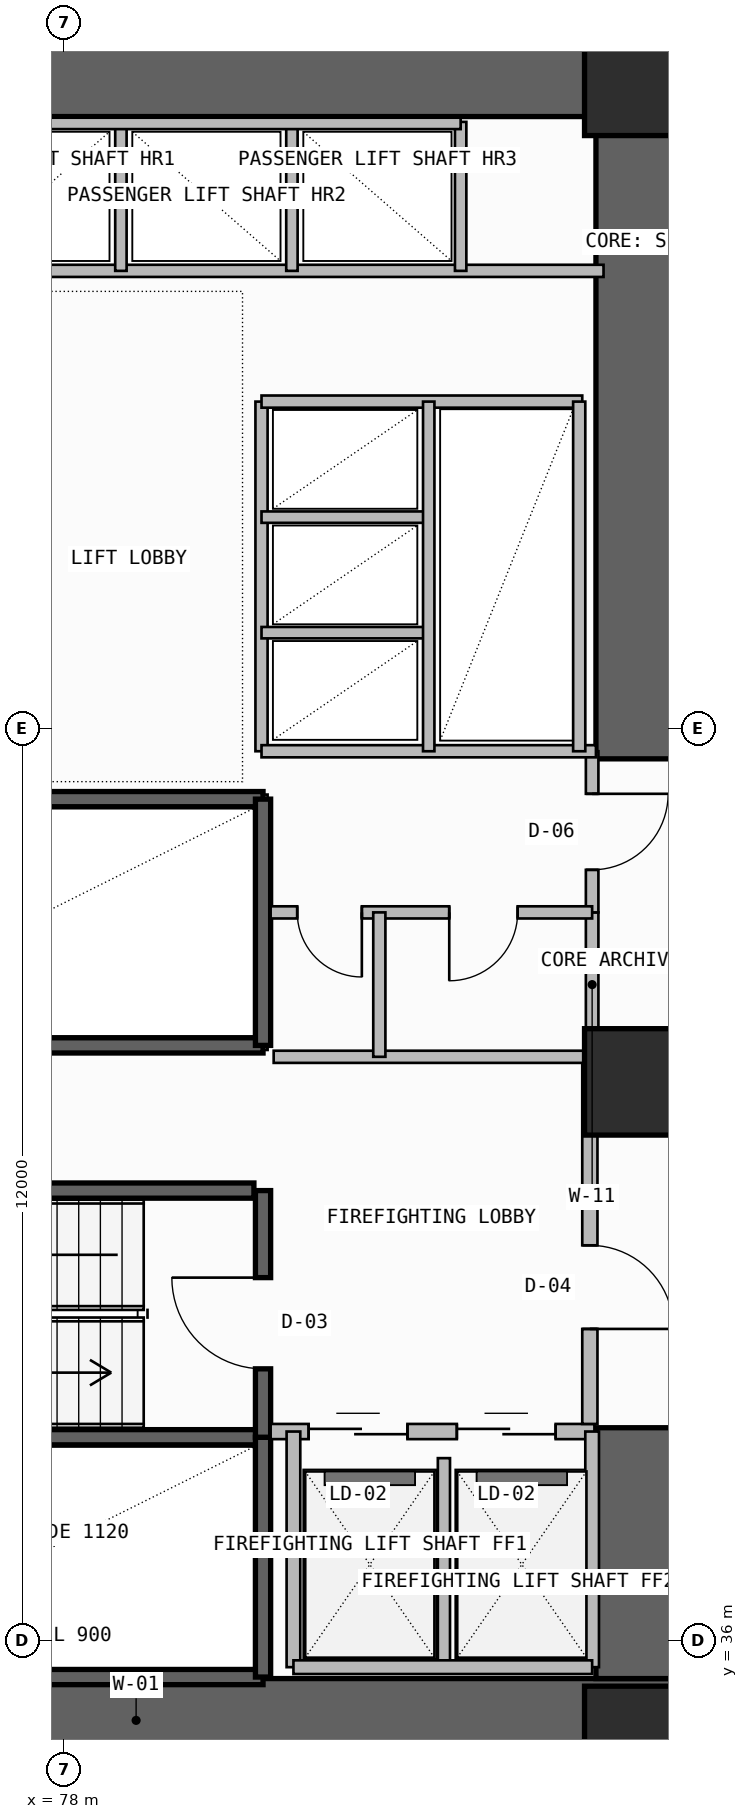
"""IFC4 building model, lengths in metres.
Left out: names, types, materials, properties, quantities, classifications, styles, units other than length and angle.
Written with IfcOpenShell. Run it as: python <this file> out.ifc"""

import sys

from ifc_helpers import new_model, si_unit, direction, frame, frame_2d, origin, origin_2d, place, context, subcontext, project, spatial, rectangle, extrude, element, fill, save


model = new_model("IFC4")
c1 = context("Model", 3, precision=1e-05, world=origin(), true_north=direction((0.0, 1.0)))
c2 = subcontext(c1, "Body", "Model", "MODEL_VIEW")
j1 = project(units=[si_unit("LENGTHUNIT", "METRE"), si_unit("PLANEANGLEUNIT", "RADIAN")], contexts=[c1])
p1 = place(None, origin())
s1 = spatial("IfcSite", under=j1, at=p1, CompositionType="ELEMENT")
p2 = place(p1, origin())
s2 = spatial("IfcBuilding", under=s1, at=p2, CompositionType="ELEMENT")
p3 = place(p2, frame((0.0, 0.0, 84.9)))
s3 = spatial("IfcBuildingStorey", under=s2, at=p3, CompositionType="ELEMENT", Elevation=84.9)
p4 = place(p3, frame((71.8, 34.95, -0.26), z_axis=(0.0, 0.0, 1.0), x_axis=(1.0, 0.0, 0.0)))
e1 = element("IfcWall", 1, at=p4, inside=s3, PredefinedType="SHEAR", context=c2, shape_type="SweptSolid", body=[
    extrude(rectangle(XDim=14.3, YDim=1.1, at=frame_2d((7.15, 0.0))), origin(), (0.0, 0.0, 1.0), 3.6),
])
p5 = place(p3, frame((85.55, 35.5, -0.26), z_axis=(0.0, 0.0, 1.0), x_axis=(0.0, 1.0, 0.0)))
e2 = element("IfcWall", 2, at=p5, inside=s3, PredefinedType="SHEAR", context=c2, shape_type="SweptSolid", body=[
    extrude(rectangle(XDim=3.3, YDim=1.1, at=frame_2d((1.65, 0.0))), origin(), (0.0, 0.0, 1.0), 3.6),
])
p6 = place(p3, frame((71.8, 56.6, -0.26), z_axis=(0.0, 0.0, 1.0), x_axis=(1.0, 0.0, 0.0)))
e3 = element("IfcWall", 3, at=p6, inside=s3, PredefinedType="SHEAR", context=c2, shape_type="SweptSolid", body=[
    extrude(rectangle(XDim=14.3, YDim=1.1, at=frame_2d((7.15, 0.0))), origin(), (0.0, 0.0, 1.0), 3.6),
])
p7 = place(p3, frame((85.55, 47.6, -0.26), z_axis=(0.0, 0.0, 1.0), x_axis=(0.0, 1.0, 0.0)))
e4 = element("IfcWall", 4, at=p7, inside=s3, PredefinedType="SHEAR", context=c2, shape_type="SweptSolid", body=[
    extrude(rectangle(XDim=8.45, YDim=1.1, at=frame_2d((4.225, 0.0))), origin(), (0.0, 0.0, 1.0), 3.6),
])
for number, where, z_axis, x_axis in (
    (5, (85.55, 34.7, 0.0), (0.0, 0.0, 1.0), (1.0, 0.0, 0.0)),
    (6, (85.55, 43.35, 0.0), (0.0, 0.0, 1.0), (1.0, 0.0, 0.0)),
    (7, (85.55, 56.5, 0.0), (0.0, 0.0, 1.0), (1.0, 0.0, 0.0)),
):
    element("IfcColumn", number, at=place(p3, frame(where, z_axis=z_axis, x_axis=x_axis)), inside=s3, PredefinedType="COLUMN", context=c2, shape_type="SweptSolid", body=[
        extrude(rectangle(XDim=1.4, YDim=1.4, at=origin_2d()), origin(), (0.0, 0.0, 1.0), 3.6),
    ])
p8 = place(p3, frame((84.957, 32.751, -0.26), z_axis=(0.0, 0.0, 1.0), x_axis=(0.997859046449, 0.065401249368, 0.0)))
e8 = element("IfcWall", 8, at=p8, inside=s3, PredefinedType="SHEAR", context=c2, shape_type="SweptSolid", body=[
    extrude(rectangle(XDim=28.4, YDim=0.85, at=frame_2d((14.2, 0.0))), origin(), (0.0, 0.0, 1.0), 3.6),
])
p9 = place(p8, frame((5.7, 0.0, 1.2)))
e9 = element("IfcOpeningElement", 9, at=p9, cuts=e8, PredefinedType="OPENING", context=c2, shape_type="SweptSolid", body=[
    extrude(rectangle(XDim=2.4, YDim=0.9, at=frame_2d((1.2, 0.45))), frame((0.0, 0.435, 0.0), z_axis=(0.0, -1.0, 0.0), x_axis=(1.0, 0.0, 0.0)), (0.0, 0.0, 1.0), 0.87),
])
for number, where, z_axis, x_axis in (
    (10, (72.92, 35.52, -0.26), (0.0, 0.0, 1.0), (1.0, 0.0, 0.0)),
    (11, (72.92, 38.675, -0.26), (0.0, 0.0, 1.0), (1.0, 0.0, 0.0)),
):
    element("IfcWall", number, at=place(p3, frame(where, z_axis=z_axis, x_axis=x_axis)), inside=s3, PredefinedType="SOLIDWALL", context=c2, shape_type="SweptSolid", body=[
        extrude(rectangle(XDim=7.7, YDim=0.2, at=frame_2d((3.85, 0.0))), origin(), (0.0, 0.0, 1.0), 3.6),
    ])
p10 = place(p3, frame((80.62, 35.52, -0.26), z_axis=(0.0, 0.0, 1.0), x_axis=(0.0, 1.0, 0.0)))
e12 = element("IfcWall", 12, at=p10, inside=s3, PredefinedType="SOLIDWALL", context=c2, shape_type="SweptSolid", body=[
    extrude(rectangle(XDim=3.155, YDim=0.2, at=frame_2d((1.578, 0.0))), origin(), (0.0, 0.0, 1.0), 3.6),
])
p11 = place(p3, frame((80.62, 38.675, -0.26), z_axis=(0.0, 0.0, 1.0), x_axis=(0.0, 1.0, 0.0)))
e13 = element("IfcWall", 13, at=p11, inside=s3, PredefinedType="SOLIDWALL", context=c2, shape_type="SweptSolid", body=[
    extrude(rectangle(XDim=3.245, YDim=0.2, at=frame_2d((1.623, 0.0))), origin(), (0.0, 0.0, 1.0), 3.6),
])
p12 = place(p11, frame((0.9, 0.0, 0.26)))
e14 = element("IfcOpeningElement", 14, at=p12, cuts=e13, PredefinedType="OPENING", context=c2, shape_type="SweptSolid", body=[
    extrude(rectangle(XDim=1.2, YDim=2.2, at=frame_2d((0.6, 1.1))), frame((0.0, 0.11, 0.0), z_axis=(0.0, -1.0, 0.0), x_axis=(1.0, 0.0, 0.0)), (0.0, 0.0, 1.0), 0.22),
])
p13 = place(p3, frame((80.72, 38.75, 0.0), z_axis=(0.0, 0.0, 1.0), x_axis=(1.0, 0.0, 0.0)))
e15 = element("IfcWall", 15, at=p13, inside=s3, PredefinedType="SOLIDWALL", context=c2, shape_type="SweptSolid", body=[
    extrude(rectangle(XDim=4.26, YDim=0.2, at=frame_2d((2.13, 0.0))), origin(), (0.0, 0.0, 1.0), 3.34),
])
p14 = place(p13, frame((0.5, 0.0, 0.0)))
e16 = element("IfcOpeningElement", 16, at=p14, cuts=e15, PredefinedType="OPENING", context=c2, shape_type="SweptSolid", body=[
    extrude(rectangle(XDim=1.3, YDim=2.3, at=frame_2d((0.65, 1.15))), frame((0.0, 0.11, 0.0), z_axis=(0.0, -1.0, 0.0), x_axis=(1.0, 0.0, 0.0)), (0.0, 0.0, 1.0), 0.22),
])
p15 = place(p13, frame((2.45, 0.0, 0.0)))
e17 = element("IfcOpeningElement", 17, at=p15, cuts=e15, PredefinedType="OPENING", context=c2, shape_type="SweptSolid", body=[
    extrude(rectangle(XDim=1.3, YDim=2.3, at=frame_2d((0.65, 1.15))), frame((0.0, 0.11, 0.0), z_axis=(0.0, -1.0, 0.0), x_axis=(1.0, 0.0, 0.0)), (0.0, 0.0, 1.0), 0.22),
])
p16 = place(p3, frame((83.0, 35.65, 0.0), z_axis=(0.0, 0.0, 1.0), x_axis=(0.0, 1.0, 0.0)))
e18 = element("IfcWall", 18, at=p16, inside=s3, PredefinedType="PLUMBINGWALL", context=c2, shape_type="SweptSolid", body=[
    extrude(rectangle(XDim=2.75, YDim=0.16, at=frame_2d((1.375, 0.0))), origin(), (0.0, 0.0, 1.0), 3.34),
])
for number, where, z_axis, x_axis in (
    (19, (84.95, 35.65, 0.0), (0.0, 0.0, 1.0), (0.0, 1.0, 0.0)),
    (20, (81.02, 35.65, 0.0), (0.0, 0.0, 1.0), (0.0, 1.0, 0.0)),
):
    element("IfcWall", number, at=place(p3, frame(where, z_axis=z_axis, x_axis=x_axis)), inside=s3, PredefinedType="SOLIDWALL", context=c2, shape_type="SweptSolid", body=[
        extrude(rectangle(XDim=3.1, YDim=0.18, at=frame_2d((1.55, 0.0))), origin(), (0.0, 0.0, 1.0), 3.34),
    ])
p17 = place(p3, frame((81.02, 35.65, 0.0), z_axis=(0.0, 0.0, 1.0), x_axis=(1.0, 0.0, 0.0)))
e21 = element("IfcWall", 21, at=p17, inside=s3, PredefinedType="SOLIDWALL", context=c2, shape_type="SweptSolid", body=[
    extrude(rectangle(XDim=3.93, YDim=0.18, at=frame_2d((1.965, 0.0))), origin(), (0.0, 0.0, 1.0), 3.34),
])
p18 = place(p3, frame((84.92, 38.85, 0.0), z_axis=(0.0, 0.0, 1.0), x_axis=(0.0, 1.0, 0.0)))
e22 = element("IfcWall", 22, at=p18, inside=s3, PredefinedType="SOLIDWALL", context=c2, shape_type="SweptSolid", body=[
    extrude(rectangle(XDim=4.83, YDim=0.2, at=frame_2d((2.415, 0.0))), origin(), (0.0, 0.0, 1.0), 3.34),
])
p19 = place(p18, frame((1.25, 0.0, 0.0)))
e23 = element("IfcOpeningElement", 23, at=p19, cuts=e22, PredefinedType="OPENING", context=c2, shape_type="SweptSolid", body=[
    extrude(rectangle(XDim=1.1, YDim=2.2, at=frame_2d((0.55, 1.1))), frame((0.0, 0.11, 0.0), z_axis=(0.0, -1.0, 0.0), x_axis=(1.0, 0.0, 0.0)), (0.0, 0.0, 1.0), 0.22),
])
p20 = place(p3, frame((72.92, 41.92, -0.26), z_axis=(0.0, 0.0, 1.0), x_axis=(1.0, 0.0, 0.0)))
e24 = element("IfcWall", 24, at=p20, inside=s3, PredefinedType="SOLIDWALL", context=c2, shape_type="SweptSolid", body=[
    extrude(rectangle(XDim=7.58, YDim=0.2, at=frame_2d((3.79, 0.0))), origin(), (0.0, 0.0, 1.0), 3.6),
])
for number, where, z_axis, x_axis in (
    (25, (72.92, 43.83, -0.26), (0.0, 0.0, 1.0), (1.0, 0.0, 0.0)),
    (26, (72.92, 47.07, -0.26), (0.0, 0.0, 1.0), (1.0, 0.0, 0.0)),
):
    element("IfcWall", number, at=place(p3, frame(where, z_axis=z_axis, x_axis=x_axis)), inside=s3, PredefinedType="SOLIDWALL", context=c2, shape_type="SweptSolid", body=[
        extrude(rectangle(XDim=7.7, YDim=0.2, at=frame_2d((3.85, 0.0))), origin(), (0.0, 0.0, 1.0), 3.6),
    ])
p21 = place(p3, frame((80.62, 43.83, -0.26), z_axis=(0.0, 0.0, 1.0), x_axis=(0.0, 1.0, 0.0)))
e27 = element("IfcWall", 27, at=p21, inside=s3, PredefinedType="SOLIDWALL", context=c2, shape_type="SweptSolid", body=[
    extrude(rectangle(XDim=3.24, YDim=0.2, at=frame_2d((1.62, 0.0))), origin(), (0.0, 0.0, 1.0), 3.6),
])
p22 = place(p3, frame((84.95, 43.68, 0.0), z_axis=(0.0, 0.0, 1.0), x_axis=(0.0, 1.0, 0.0)))
e28 = element("IfcWall", 28, at=p22, inside=s3, PredefinedType="PLUMBINGWALL", context=c2, shape_type="SweptSolid", body=[
    extrude(rectangle(XDim=1.9, YDim=0.165, at=frame_2d((0.95, 0.0))), origin(), (0.0, 0.0, 1.0), 3.34),
])
p23 = place(p3, frame((84.95, 45.58, 0.0), z_axis=(0.0, 0.0, 1.0), x_axis=(0.0, 1.0, 0.0)))
e29 = element("IfcWall", 29, at=p23, inside=s3, PredefinedType="PARTITIONING", context=c2, shape_type="SweptSolid", body=[
    extrude(rectangle(XDim=2.12, YDim=0.165, at=frame_2d((1.06, 0.0))), origin(), (0.0, 0.0, 1.0), 3.34),
])
p24 = place(p23, frame((0.56, 0.0, 0.0)))
e30 = element("IfcOpeningElement", 30, at=p24, cuts=e29, PredefinedType="OPENING", context=c2, shape_type="SweptSolid", body=[
    extrude(rectangle(XDim=1.0, YDim=2.2, at=frame_2d((0.5, 1.1))), frame((0.0, 0.093, 0.0), z_axis=(0.0, -1.0, 0.0), x_axis=(1.0, 0.0, 0.0)), (0.0, 0.0, 1.0), 0.185),
])
p25 = place(p3, frame((80.72, 45.58, 0.0), z_axis=(0.0, 0.0, 1.0), x_axis=(1.0, 0.0, 0.0)))
e31 = element("IfcWall", 31, at=p25, inside=s3, PredefinedType="PLUMBINGWALL", context=c2, shape_type="SweptSolid", body=[
    extrude(rectangle(XDim=4.23, YDim=0.16, at=frame_2d((2.115, 0.0))), origin(), (0.0, 0.0, 1.0), 3.34),
])
p26 = place(p25, frame((0.35, 0.0, 0.0)))
e32 = element("IfcOpeningElement", 32, at=p26, cuts=e31, PredefinedType="OPENING", context=c2, shape_type="SweptSolid", body=[
    extrude(rectangle(XDim=0.85, YDim=2.05, at=frame_2d((0.425, 1.025))), frame((0.0, 0.09, 0.0), z_axis=(0.0, -1.0, 0.0), x_axis=(1.0, 0.0, 0.0)), (0.0, 0.0, 1.0), 0.18),
])
p27 = place(p25, frame((2.35, 0.0, 0.0)))
e33 = element("IfcOpeningElement", 33, at=p27, cuts=e31, PredefinedType="OPENING", context=c2, shape_type="SweptSolid", body=[
    extrude(rectangle(XDim=0.9, YDim=2.1, at=frame_2d((0.45, 1.05))), frame((0.0, 0.09, 0.0), z_axis=(0.0, -1.0, 0.0), x_axis=(1.0, 0.0, 0.0)), (0.0, 0.0, 1.0), 0.18),
])
p28 = place(p3, frame((80.76, 43.68, 0.0), z_axis=(0.0, 0.0, 1.0), x_axis=(1.0, 0.0, 0.0)))
e34 = element("IfcWall", 34, at=p28, inside=s3, PredefinedType="PLUMBINGWALL", context=c2, shape_type="SweptSolid", body=[
    extrude(rectangle(XDim=4.19, YDim=0.16, at=frame_2d((2.095, 0.0))), origin(), (0.0, 0.0, 1.0), 3.34),
])
p29 = place(p3, frame((82.15, 43.68, 0.0), z_axis=(0.0, 0.0, 1.0), x_axis=(0.0, 1.0, 0.0)))
e35 = element("IfcWall", 35, at=p29, inside=s3, PredefinedType="PLUMBINGWALL", context=c2, shape_type="SweptSolid", body=[
    extrude(rectangle(XDim=1.9, YDim=0.16, at=frame_2d((0.95, 0.0))), origin(), (0.0, 0.0, 1.0), 3.34),
])
p30 = place(p3, frame((80.6, 47.7, 0.0), z_axis=(0.0, 0.0, 1.0), x_axis=(0.0, 1.0, 0.0)))
e36 = element("IfcWall", 36, at=p30, inside=s3, PredefinedType="SOLIDWALL", context=c2, shape_type="SweptSolid", body=[
    extrude(rectangle(XDim=4.6, YDim=0.16, at=frame_2d((2.3, 0.0))), origin(), (0.0, 0.0, 1.0), 3.34),
])
p31 = place(p3, frame((80.6, 47.7, 0.0), z_axis=(0.0, 0.0, 1.0), x_axis=(1.0, 0.0, 0.0)))
e37 = element("IfcWall", 37, at=p31, inside=s3, PredefinedType="SOLIDWALL", context=c2, shape_type="SweptSolid", body=[
    extrude(rectangle(XDim=4.4, YDim=0.16, at=frame_2d((2.2, 0.0))), origin(), (0.0, 0.0, 1.0), 3.34),
])
p32 = place(p3, frame((80.6, 52.3, 0.0), z_axis=(0.0, 0.0, 1.0), x_axis=(1.0, 0.0, 0.0)))
e38 = element("IfcWall", 38, at=p32, inside=s3, PredefinedType="SOLIDWALL", context=c2, shape_type="SweptSolid", body=[
    extrude(rectangle(XDim=4.22, YDim=0.16, at=frame_2d((2.11, 0.0))), origin(), (0.0, 0.0, 1.0), 3.34),
])
for number, where, z_axis, x_axis in (
    (39, (80.6, 49.26, 0.0), (0.0, 0.0, 1.0), (1.0, 0.0, 0.0)),
    (40, (80.6, 50.78, 0.0), (0.0, 0.0, 1.0), (1.0, 0.0, 0.0)),
):
    element("IfcWall", number, at=place(p3, frame(where, z_axis=z_axis, x_axis=x_axis)), inside=s3, PredefinedType="PLUMBINGWALL", context=c2, shape_type="SweptSolid", body=[
        extrude(rectangle(XDim=2.2, YDim=0.15, at=frame_2d((1.1, 0.0))), origin(), (0.0, 0.0, 1.0), 3.34),
    ])
p33 = place(p3, frame((82.8, 47.7, 0.0), z_axis=(0.0, 0.0, 1.0), x_axis=(0.0, 1.0, 0.0)))
e41 = element("IfcWall", 41, at=p33, inside=s3, PredefinedType="PLUMBINGWALL", context=c2, shape_type="SweptSolid", body=[
    extrude(rectangle(XDim=4.6, YDim=0.15, at=frame_2d((2.3, 0.0))), origin(), (0.0, 0.0, 1.0), 3.34),
])
p34 = place(p3, frame((84.78, 47.7, 0.0), z_axis=(0.0, 0.0, 1.0), x_axis=(0.0, 1.0, 0.0)))
e42 = element("IfcWall", 42, at=p34, inside=s3, PredefinedType="SOLIDWALL", context=c2, shape_type="SweptSolid", body=[
    extrude(rectangle(XDim=4.6, YDim=0.16, at=frame_2d((2.3, 0.0))), origin(), (0.0, 0.0, 1.0), 3.34),
])
p35 = place(p3, frame((73.02, 54.02, 0.0), z_axis=(0.0, 0.0, 1.0), x_axis=(1.0, 0.0, 0.0)))
e43 = element("IfcWall", 43, at=p35, inside=s3, PredefinedType="SOLIDWALL", context=c2, shape_type="SweptSolid", body=[
    extrude(rectangle(XDim=12.08, YDim=0.16, at=frame_2d((6.04, 0.0))), origin(), (0.0, 0.0, 1.0), 3.34),
])
for number, where, z_axis, x_axis in (
    (44, (78.75, 54.02, 0.0), (0.0, 0.0, 1.0), (0.0, 1.0, 0.0)),
    (45, (81.0, 54.02, 0.0), (0.0, 0.0, 1.0), (0.0, 1.0, 0.0)),
):
    element("IfcWall", number, at=place(p3, frame(where, z_axis=z_axis, x_axis=x_axis)), inside=s3, PredefinedType="PLUMBINGWALL", context=c2, shape_type="SweptSolid", body=[
        extrude(rectangle(XDim=1.96, YDim=0.15, at=frame_2d((0.98, 0.0))), origin(), (0.0, 0.0, 1.0), 3.34),
    ])
p36 = place(p3, frame((83.22, 54.02, 0.0), z_axis=(0.0, 0.0, 1.0), x_axis=(0.0, 1.0, 0.0)))
e46 = element("IfcWall", 46, at=p36, inside=s3, PredefinedType="SOLIDWALL", context=c2, shape_type="SweptSolid", body=[
    extrude(rectangle(XDim=1.96, YDim=0.15, at=frame_2d((0.98, 0.0))), origin(), (0.0, 0.0, 1.0), 3.34),
])
p37 = place(p3, frame((76.52, 55.96, 0.0), z_axis=(0.0, 0.0, 1.0), x_axis=(1.0, 0.0, 0.0)))
e47 = element("IfcWall", 47, at=p37, inside=s3, PredefinedType="SOLIDWALL", context=c2, shape_type="SweptSolid", body=[
    extrude(rectangle(XDim=6.7, YDim=0.15, at=frame_2d((3.35, 0.0))), origin(), (0.0, 0.0, 1.0), 3.34),
])
p38 = place(p12, origin())
e48 = element("IfcDoor", 48, at=p38, inside=s3, OperationType="SINGLE_SWING_RIGHT", PredefinedType="USERDEFINED", context=c2, shape_type="SweptSolid", body=[
    extrude(rectangle(XDim=1.2, YDim=2.2, at=frame_2d((0.6, 1.1))), frame((0.0, 0.025, 0.0), z_axis=(0.0, -1.0, 0.0), x_axis=(1.0, 0.0, 0.0)), (0.0, 0.0, 1.0), 0.05),
])
fill(e14, e48)
p39 = place(p14, origin())
e49 = element("IfcDoor", 49, at=p39, inside=s3, OperationType="DOUBLE_DOOR_SLIDING", PredefinedType="DOOR", context=c2, shape_type="SweptSolid", body=[
    extrude(rectangle(XDim=1.3, YDim=2.3, at=frame_2d((0.65, 1.15))), frame((0.0, 0.025, 0.0), z_axis=(0.0, -1.0, 0.0), x_axis=(1.0, 0.0, 0.0)), (0.0, 0.0, 1.0), 0.05),
])
fill(e16, e49)
p40 = place(p15, origin())
e50 = element("IfcDoor", 50, at=p40, inside=s3, OperationType="DOUBLE_DOOR_SLIDING", PredefinedType="DOOR", context=c2, shape_type="SweptSolid", body=[
    extrude(rectangle(XDim=1.3, YDim=2.3, at=frame_2d((0.65, 1.15))), frame((0.0, 0.025, 0.0), z_axis=(0.0, -1.0, 0.0), x_axis=(1.0, 0.0, 0.0)), (0.0, 0.0, 1.0), 0.05),
])
fill(e17, e50)
p41 = place(p19, frame((1.1, 0.0, 0.0), z_axis=(0.0, 0.0, 1.0), x_axis=(-1.0, 0.0, 0.0)))
e51 = element("IfcDoor", 51, at=p41, inside=s3, OperationType="SINGLE_SWING_RIGHT", PredefinedType="DOOR", context=c2, shape_type="SweptSolid", body=[
    extrude(rectangle(XDim=1.1, YDim=2.2, at=frame_2d((0.55, 1.1))), frame((0.0, 0.025, 0.0), z_axis=(0.0, -1.0, 0.0), x_axis=(1.0, 0.0, 0.0)), (0.0, 0.0, 1.0), 0.05),
])
fill(e23, e51)
p42 = place(p24, frame((1.0, 0.0, 0.0), z_axis=(0.0, 0.0, 1.0), x_axis=(-1.0, 0.0, 0.0)))
e52 = element("IfcDoor", 52, at=p42, inside=s3, OperationType="SINGLE_SWING_LEFT", PredefinedType="DOOR", context=c2, shape_type="SweptSolid", body=[
    extrude(rectangle(XDim=1.0, YDim=2.2, at=frame_2d((0.5, 1.1))), frame((0.0, 0.025, 0.0), z_axis=(0.0, -1.0, 0.0), x_axis=(1.0, 0.0, 0.0)), (0.0, 0.0, 1.0), 0.05),
])
fill(e30, e52)
p43 = place(p26, frame((0.85, 0.0, 0.0), z_axis=(0.0, 0.0, 1.0), x_axis=(-1.0, 0.0, 0.0)))
e53 = element("IfcDoor", 53, at=p43, inside=s3, OperationType="SINGLE_SWING_LEFT", PredefinedType="DOOR", context=c2, shape_type="SweptSolid", body=[
    extrude(rectangle(XDim=0.85, YDim=2.05, at=frame_2d((0.425, 1.025))), frame((0.0, 0.025, 0.0), z_axis=(0.0, -1.0, 0.0), x_axis=(1.0, 0.0, 0.0)), (0.0, 0.0, 1.0), 0.05),
])
fill(e32, e53)
p44 = place(p27, frame((0.9, 0.0, 0.0), z_axis=(0.0, 0.0, 1.0), x_axis=(-1.0, 0.0, 0.0)))
e54 = element("IfcDoor", 54, at=p44, inside=s3, OperationType="SINGLE_SWING_RIGHT", PredefinedType="DOOR", context=c2, shape_type="SweptSolid", body=[
    extrude(rectangle(XDim=0.9, YDim=2.1, at=frame_2d((0.45, 1.05))), frame((0.0, 0.025, 0.0), z_axis=(0.0, -1.0, 0.0), x_axis=(1.0, 0.0, 0.0)), (0.0, 0.0, 1.0), 0.05),
])
fill(e33, e54)
save(model, sys.argv[1])
